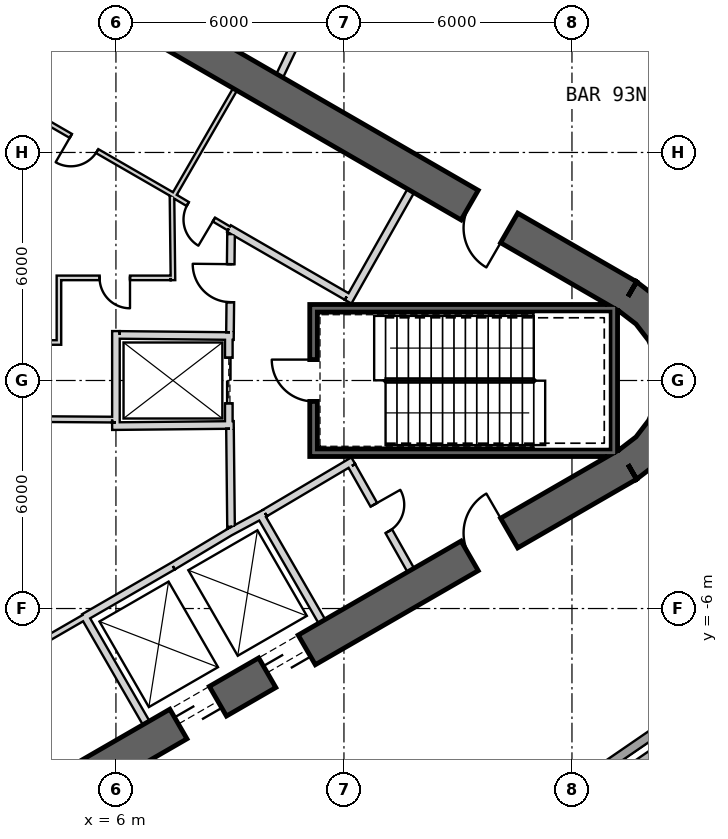
"""IFC4 building model, lengths in metres.
Left out: names, types, materials, properties, quantities, classifications, styles, units other than length and angle.
Written with IfcOpenShell. Run it as: python <this file> out.ifc"""

import sys

from ifc_helpers import new_model, si_unit, direction, frame, frame_2d, origin, place, context, subcontext, project, spatial, polyline, rectangle, outline, extrude, element, fill, save


model = new_model("IFC4")
c1 = context("Model", 3, precision=1e-05, world=origin(), true_north=direction((0.0, 1.0)))
c2 = subcontext(c1, "Body", "Model", "MODEL_VIEW")
j1 = project(units=[si_unit("LENGTHUNIT", "METRE"), si_unit("PLANEANGLEUNIT", "RADIAN")], contexts=[c1])
p1 = place(None, origin())
s1 = spatial("IfcSite", under=j1, at=p1, CompositionType="ELEMENT")
p2 = place(p1, origin())
s2 = spatial("IfcBuilding", under=s1, at=p2, CompositionType="ELEMENT")
p3 = place(p2, frame((0.0, 0.0, 410.3)))
s3 = spatial("IfcBuildingStorey", under=s2, at=p3, CompositionType="ELEMENT", Elevation=410.3)
p4 = place(p3, frame((19.475, 2.208, 0.0), z_axis=(0.0, 0.0, 1.0), x_axis=(-0.866028369851, 0.499994862586, 0.0)))
e1 = element("IfcWall", 1, at=p4, inside=s3, PredefinedType="SHEAR", context=c2, shape_type="SweptSolid", body=[
    extrude(rectangle(XDim=31.523, YDim=0.9, at=frame_2d((15.762, 0.0))), origin(), (0.0, 0.0, 1.0), 5.0),
])
p5 = place(p4, frame((3.612, 0.0, 0.0)))
e2 = element("IfcOpeningElement", 2, at=p5, cuts=e1, PredefinedType="OPENING", context=c2, shape_type="SweptSolid", body=[
    extrude(rectangle(XDim=1.2, YDim=2.4, at=frame_2d((0.6, 1.2))), frame((0.0, 0.46, 0.0), z_axis=(0.0, -1.0, 0.0), x_axis=(1.0, 0.0, 0.0)), (0.0, 0.0, 1.0), 0.92),
])
p6 = place(p4, frame((26.712, 0.0, 0.0)))
e3 = element("IfcOpeningElement", 3, at=p6, cuts=e1, PredefinedType="OPENING", context=c2, shape_type="SweptSolid", body=[
    extrude(rectangle(XDim=1.2, YDim=2.4, at=frame_2d((0.6, 1.2))), frame((0.0, 0.46, 0.0), z_axis=(0.0, -1.0, 0.0), x_axis=(1.0, 0.0, 0.0)), (0.0, 0.0, 1.0), 0.92),
])
p7 = place(p3, frame((-7.825, -17.97, 0.0), z_axis=(0.0, 0.0, 1.0), x_axis=(0.866028369851, 0.499994862586, 0.0)))
e4 = element("IfcWall", 4, at=p7, inside=s3, PredefinedType="SHEAR", context=c2, shape_type="SweptSolid", body=[
    extrude(rectangle(XDim=31.523, YDim=0.9, at=frame_2d((15.762, 0.0))), origin(), (0.0, 0.0, 1.0), 5.0),
])
p8 = place(p7, frame((17.862, 0.0, 0.0)))
e5 = element("IfcOpeningElement", 5, at=p8, cuts=e4, PredefinedType="OPENING", context=c2, shape_type="SweptSolid", body=[
    extrude(rectangle(XDim=1.2, YDim=2.4, at=frame_2d((0.6, 1.2))), frame((0.0, 0.46, 0.0), z_axis=(0.0, -1.0, 0.0), x_axis=(1.0, 0.0, 0.0)), (0.0, 0.0, 1.0), 0.92),
])
p9 = place(p7, frame((20.562, 0.0, 0.0)))
e6 = element("IfcOpeningElement", 6, at=p9, cuts=e4, PredefinedType="OPENING", context=c2, shape_type="SweptSolid", body=[
    extrude(rectangle(XDim=1.2, YDim=2.4, at=frame_2d((0.6, 1.2))), frame((0.0, 0.46, 0.0), z_axis=(0.0, -1.0, 0.0), x_axis=(1.0, 0.0, 0.0)), (0.0, 0.0, 1.0), 0.92),
])
p10 = place(p7, frame((26.712, 0.0, 0.0)))
e7 = element("IfcOpeningElement", 7, at=p10, cuts=e4, PredefinedType="OPENING", context=c2, shape_type="SweptSolid", body=[
    extrude(rectangle(XDim=1.2, YDim=2.4, at=frame_2d((0.6, 1.2))), frame((0.0, 0.46, 0.0), z_axis=(0.0, -1.0, 0.0), x_axis=(1.0, 0.0, 0.0)), (0.0, 0.0, 1.0), 0.92),
])
p11 = place(p7, frame((3.612, 0.0, 0.0)))
e8 = element("IfcOpeningElement", 8, at=p11, cuts=e4, PredefinedType="OPENING", context=c2, shape_type="SweptSolid", body=[
    extrude(rectangle(XDim=1.2, YDim=2.4, at=frame_2d((0.6, 1.2))), frame((0.0, 0.46, 0.0), z_axis=(0.0, -1.0, 0.0), x_axis=(1.0, 0.0, 0.0)), (0.0, 0.0, 1.0), 0.92),
])
p12 = place(p3, origin())
e9 = element("IfcWall", 9, at=p12, inside=s3, PredefinedType="SHEAR", context=c2, shape_type="SweptSolid", body=[
    extrude(outline(polyline([(19.7, -2.598), (20.321, -2.121), (20.798, -1.5), (21.098, -0.777), (21.2, 0.0), (21.098, 0.777), (20.798, 1.5), (20.321, 2.121), (19.7, 2.598), (19.25, 1.819), (19.685, 1.485), (20.019, 1.05), (20.229, 0.543), (20.3, 0.0), (20.229, -0.543), (20.019, -1.05), (19.685, -1.485), (19.25, -1.819), (19.7, -2.598)])), origin(), (0.0, 0.0, 1.0), 5.0),
])
p13 = place(p3, frame((-1.186, -23.926, 0.0), z_axis=(0.0, 0.0, 1.0), x_axis=(0.824480875731, 0.565889817503, 0.0)))
e10 = element("IfcWall", 10, at=p13, inside=s3, PredefinedType="SOLIDWALL", context=c2, shape_type="SweptSolid", body=[
    extrude(rectangle(XDim=26.064, YDim=0.24, at=frame_2d((13.032, 0.0))), origin(), (0.0, 0.0, 1.0), 4.75),
])
p14 = place(p3, frame((21.34, -9.818, 0.04), z_axis=(0.0, 0.0, 1.0), x_axis=(-0.82447788812, -0.565894170319, 0.0)))
e11 = element("IfcWall", 11, at=p14, inside=s3, PredefinedType="PARAPET", context=c2, shape_type="SweptSolid", body=[
    extrude(rectangle(XDim=27.207, YDim=0.25, at=frame_2d((13.603, 0.0))), origin(), (0.0, 0.0, 1.0), 1.2),
])
p15 = place(p3, frame((20.588, -9.667, 0.04), z_axis=(0.0, 0.0, 1.0), x_axis=(-0.824474055668, -0.565899753958, 0.0)))
e12 = element("IfcWall", 12, at=p15, inside=s3, PredefinedType="PARAPET", context=c2, shape_type="SweptSolid", body=[
    extrude(rectangle(XDim=26.031, YDim=0.5, at=frame_2d((13.016, 0.0))), origin(), (0.0, 0.0, 1.0), 0.6),
])
p16 = place(p3, frame((6.795, -9.01, 0.0), z_axis=(0.0, 0.0, 1.0), x_axis=(-0.499984717929, 0.866034226713, 0.0)))
e13 = element("IfcWall", 13, at=p16, inside=s3, PredefinedType="PLUMBINGWALL", context=c2, shape_type="SweptSolid", body=[
    extrude(rectangle(XDim=3.25, YDim=0.2, at=frame_2d((1.625, 0.0))), origin(), (0.0, 0.0, 1.0), 4.75),
])
p17 = place(p3, frame((5.159, -6.236, 0.0), z_axis=(0.0, 0.0, 1.0), x_axis=(0.866036505625, 0.499980770555, 0.0)))
e14 = element("IfcWall", 14, at=p17, inside=s3, PredefinedType="PLUMBINGWALL", context=c2, shape_type="SweptSolid", body=[
    extrude(rectangle(XDim=2.7, YDim=0.2, at=frame_2d((1.35, 0.0))), origin(), (0.0, 0.0, 1.0), 4.75),
])
p18 = place(p3, frame((9.795, -3.525, 0.0), z_axis=(0.0, 0.0, 1.0), x_axis=(0.499984717929, -0.866034226713, 0.0)))
e15 = element("IfcWall", 15, at=p18, inside=s3, PredefinedType="PLUMBINGWALL", context=c2, shape_type="SweptSolid", body=[
    extrude(rectangle(XDim=3.25, YDim=0.2, at=frame_2d((1.625, 0.0))), origin(), (0.0, 0.0, 1.0), 4.75),
])
p19 = place(p3, frame((8.974, -3.999, 0.0), z_axis=(0.0, 0.0, 1.0), x_axis=(0.880907015104, 0.473289373154, 0.0)))
e16 = element("IfcWall", 16, at=p19, inside=s3, PredefinedType="PLUMBINGWALL", context=c2, shape_type="SweptSolid", body=[
    extrude(rectangle(XDim=1.078, YDim=0.2, at=frame_2d((0.539, 0.0))), origin(), (0.0, 0.0, 1.0), 4.75),
])
p20 = place(p3, frame((7.497, -4.886, 0.0), z_axis=(0.0, 0.0, 1.0), x_axis=(0.857516281273, 0.51445682749, 0.0)))
e17 = element("IfcWall", 17, at=p20, inside=s3, PredefinedType="PLUMBINGWALL", context=c2, shape_type="SweptSolid", body=[
    extrude(rectangle(XDim=1.845, YDim=0.2, at=frame_2d((0.922, 0.0))), origin(), (0.0, 0.0, 1.0), 4.75),
])
p21 = place(p3, frame((19.2, 1.9, -0.25), z_axis=(0.0, 0.0, 1.0), x_axis=(-1.0, 0.0, 0.0)))
e18 = element("IfcWall", 18, at=p21, inside=s3, PredefinedType="SHEAR", context=c2, shape_type="SweptSolid", body=[
    extrude(rectangle(XDim=8.1, YDim=0.2, at=frame_2d((4.05, 0.0))), origin(), (0.0, 0.0, 1.0), 5.0),
])
p22 = place(p3, frame((19.1, -2.0, -0.25), z_axis=(0.0, 0.0, 1.0), x_axis=(0.0, 1.0, 0.0)))
e19 = element("IfcWall", 19, at=p22, inside=s3, PredefinedType="SHEAR", context=c2, shape_type="SweptSolid", body=[
    extrude(rectangle(XDim=3.8, YDim=0.2, at=frame_2d((1.9, 0.0))), origin(), (0.0, 0.0, 1.0), 5.0),
])
p23 = place(p3, frame((11.1, -1.9, -0.25), z_axis=(0.0, 0.0, 1.0), x_axis=(1.0, 0.0, 0.0)))
e20 = element("IfcWall", 20, at=p23, inside=s3, PredefinedType="SHEAR", context=c2, shape_type="SweptSolid", body=[
    extrude(rectangle(XDim=7.9, YDim=0.2, at=frame_2d((3.95, 0.0))), origin(), (0.0, 0.0, 1.0), 5.0),
])
p24 = place(p3, frame((11.2, -1.8, -0.25), z_axis=(0.0, 0.0, 1.0), x_axis=(0.0, 1.0, 0.0)))
e21 = element("IfcWall", 21, at=p24, inside=s3, PredefinedType="SHEAR", context=c2, shape_type="SweptSolid", body=[
    extrude(rectangle(XDim=3.6, YDim=0.2, at=frame_2d((1.8, 0.0))), origin(), (0.0, 0.0, 1.0), 5.0),
])
p25 = place(p24, frame((1.25, 0.0, 0.25)))
e22 = element("IfcOpeningElement", 22, at=p25, cuts=e21, PredefinedType="OPENING", context=c2, shape_type="SweptSolid", body=[
    extrude(rectangle(XDim=1.1, YDim=2.1, at=frame_2d((0.55, 1.05))), frame((0.0, 0.11, 0.0), z_axis=(0.0, -1.0, 0.0), x_axis=(1.0, 0.0, 0.0)), (0.0, 0.0, 1.0), 0.22),
])
p26 = place(p3, frame((8.97, 1.2, 0.0), z_axis=(0.0, 0.0, 1.0), x_axis=(0.0, -1.0, 0.0)))
e23 = element("IfcWall", 23, at=p26, inside=s3, PredefinedType="PLUMBINGWALL", context=c2, shape_type="SweptSolid", body=[
    extrude(rectangle(XDim=2.4, YDim=0.2, at=frame_2d((1.2, 0.0))), origin(), (0.0, 0.0, 1.0), 4.75),
])
p27 = place(p26, frame((0.6, 0.0, 0.0)))
e24 = element("IfcOpeningElement", 24, at=p27, cuts=e23, PredefinedType="OPENING", context=c2, shape_type="SweptSolid", body=[
    extrude(rectangle(XDim=1.2, YDim=2.4, at=frame_2d((0.6, 1.2))), frame((0.0, 0.11, 0.0), z_axis=(0.0, -1.0, 0.0), x_axis=(1.0, 0.0, 0.0)), (0.0, 0.0, 1.0), 0.22),
])
p28 = place(p3, frame((9.1, -1.169, 0.0), z_axis=(0.0, 0.0, 1.0), x_axis=(-0.999950064753, -0.009993397809, 0.0)))
e25 = element("IfcWall", 25, at=p28, inside=s3, PredefinedType="PLUMBINGWALL", context=c2, shape_type="SweptSolid", body=[
    extrude(rectangle(XDim=3.2, YDim=0.2, at=frame_2d((1.6, 0.0))), origin(), (0.0, 0.0, 1.0), 4.75),
])
p29 = place(p3, frame((6.0, -1.1, 0.0), z_axis=(0.0, 0.0, 1.0), x_axis=(0.0, 1.0, 0.0)))
e26 = element("IfcWall", 26, at=p29, inside=s3, PredefinedType="PLUMBINGWALL", context=c2, shape_type="SweptSolid", body=[
    extrude(rectangle(XDim=2.4, YDim=0.2, at=frame_2d((1.2, 0.0))), origin(), (0.0, 0.0, 1.0), 4.75),
])
p30 = place(p3, frame((9.1, 1.169, 0.0), z_axis=(0.0, 0.0, 1.0), x_axis=(-0.99994990606, 0.010009264196, 0.0)))
e27 = element("IfcWall", 27, at=p30, inside=s3, PredefinedType="PLUMBINGWALL", context=c2, shape_type="SweptSolid", body=[
    extrude(rectangle(XDim=3.0, YDim=0.2, at=frame_2d((1.5, 0.0))), origin(), (0.0, 0.0, 1.0), 4.75),
])
p31 = place(p3, frame((9.133, 7.659, 0.0), z_axis=(0.0, 0.0, 1.0), x_axis=(-0.500017246033, -0.866015446554, 0.0)))
e28 = element("IfcWall", 28, at=p31, inside=s3, PredefinedType="PARTITIONING", context=c2, shape_type="SweptSolid", body=[
    extrude(rectangle(XDim=3.25, YDim=0.12, at=frame_2d((1.625, 0.0))), origin(), (0.0, 0.0, 1.0), 4.75),
])
p32 = place(p3, frame((12.11, 2.073, 0.0), z_axis=(0.0, 0.0, 1.0), x_axis=(0.49196600604, 0.870614408852, 0.0)))
e29 = element("IfcWall", 29, at=p32, inside=s3, PredefinedType="PARTITIONING", context=c2, shape_type="SweptSolid", body=[
    extrude(rectangle(XDim=3.35, YDim=0.2, at=frame_2d((1.675, 0.0))), origin(), (0.0, 0.0, 1.0), 4.75),
])
p33 = place(p3, frame((8.974, 3.999, 0.0), z_axis=(0.0, 0.0, 1.0), x_axis=(0.86601284211, -0.500021756827, 0.0)))
e30 = element("IfcWall", 30, at=p33, inside=s3, PredefinedType="PARTITIONING", context=c2, shape_type="SweptSolid", body=[
    extrude(rectangle(XDim=3.577, YDim=0.2, at=frame_2d((1.789, 0.0))), origin(), (0.0, 0.0, 1.0), 4.75),
])
p34 = place(p3, frame((7.493, 4.878, 0.0), z_axis=(0.0, 0.0, 1.0), x_axis=(0.859934455514, -0.510404479035, 0.0)))
e31 = element("IfcWall", 31, at=p34, inside=s3, PredefinedType="PARTITIONING", context=c2, shape_type="SweptSolid", body=[
    extrude(rectangle(XDim=1.722, YDim=0.12, at=frame_2d((0.861, 0.0))), origin(), (0.0, 0.0, 1.0), 4.75),
])
p35 = place(p34, frame((0.461, 0.0, 0.0)))
e32 = element("IfcOpeningElement", 32, at=p35, cuts=e31, PredefinedType="OPENING", context=c2, shape_type="SweptSolid", body=[
    extrude(rectangle(XDim=0.8, YDim=2.1, at=frame_2d((0.4, 1.05))), frame((0.0, 0.07, 0.0), z_axis=(0.0, -1.0, 0.0), x_axis=(1.0, 0.0, 0.0)), (0.0, 0.0, 1.0), 0.14),
])
p36 = place(p3, frame((4.457, 10.359, 0.0), z_axis=(0.0, 0.0, 1.0), x_axis=(-0.500017246033, -0.866015446554, 0.0)))
e33 = element("IfcWall", 33, at=p36, inside=s3, PredefinedType="PARTITIONING", context=c2, shape_type="SweptSolid", body=[
    extrude(rectangle(XDim=3.25, YDim=0.12, at=frame_2d((1.625, 0.0))), origin(), (0.0, 0.0, 1.0), 4.75),
])
p37 = place(p3, frame((7.497, 4.886, 0.0), z_axis=(0.0, 0.0, 1.0), x_axis=(-0.866030989016, 0.499990325971, 0.0)))
e34 = element("IfcWall", 34, at=p37, inside=s3, PredefinedType="PARTITIONING", context=c2, shape_type="SweptSolid", body=[
    extrude(rectangle(XDim=8.1, YDim=0.12, at=frame_2d((4.05, 0.0))), origin(), (0.0, 0.0, 1.0), 4.75),
])
p38 = place(p37, frame((2.3, 0.0, 0.0)))
e35 = element("IfcOpeningElement", 35, at=p38, cuts=e34, PredefinedType="OPENING", context=c2, shape_type="SweptSolid", body=[
    extrude(rectangle(XDim=0.8, YDim=2.1, at=frame_2d((0.4, 1.05))), frame((0.0, 0.07, 0.0), z_axis=(0.0, -1.0, 0.0), x_axis=(1.0, 0.0, 0.0)), (0.0, 0.0, 1.0), 0.14),
])
p39 = place(p37, frame((6.35, 0.0, 0.0)))
e36 = element("IfcOpeningElement", 36, at=p39, cuts=e34, PredefinedType="OPENING", context=c2, shape_type="SweptSolid", body=[
    extrude(rectangle(XDim=0.8, YDim=2.1, at=frame_2d((0.4, 1.05))), frame((0.0, 0.07, 0.0), z_axis=(0.0, -1.0, 0.0), x_axis=(1.0, 0.0, 0.0)), (0.0, 0.0, 1.0), 0.14),
])
p40 = place(p3, frame((0.483, -8.936, 0.0), z_axis=(0.0, 0.0, 1.0), x_axis=(0.866028230842, 0.499995103361, 0.0)))
e37 = element("IfcWall", 37, at=p40, inside=s3, PredefinedType="PLUMBINGWALL", context=c2, shape_type="SweptSolid", body=[
    extrude(rectangle(XDim=5.4, YDim=0.15, at=frame_2d((2.7, 0.0))), origin(), (0.0, 0.0, 1.0), 4.75),
])
p41 = place(p3, frame((12.245, -2.109, 0.0), z_axis=(0.0, 0.0, 1.0), x_axis=(-0.860414880418, -0.509594185166, 0.0)))
e38 = element("IfcWall", 38, at=p41, inside=s3, PredefinedType="PARTITIONING", context=c2, shape_type="SweptSolid", body=[
    extrude(rectangle(XDim=2.7, YDim=0.2, at=frame_2d((1.35, 0.0))), origin(), (0.0, 0.0, 1.0), 4.75),
])
p42 = place(p3, frame((13.758, -4.99, 0.0), z_axis=(0.0, 0.0, 1.0), x_axis=(-0.491993409184, 0.87059892334, 0.0)))
e39 = element("IfcWall", 39, at=p42, inside=s3, PredefinedType="PARTITIONING", context=c2, shape_type="SweptSolid", body=[
    extrude(rectangle(XDim=3.15, YDim=0.2, at=frame_2d((1.575, 0.0))), origin(), (0.0, 0.0, 1.0), 4.75),
])
p43 = place(p42, frame((1.175, 0.0, 0.0)))
e40 = element("IfcOpeningElement", 40, at=p43, cuts=e39, PredefinedType="OPENING", context=c2, shape_type="SweptSolid", body=[
    extrude(rectangle(XDim=0.8, YDim=2.1, at=frame_2d((0.4, 1.05))), frame((0.0, 0.11, 0.0), z_axis=(0.0, -1.0, 0.0), x_axis=(1.0, 0.0, 0.0)), (0.0, 0.0, 1.0), 0.22),
])
p44 = place(p3, frame((9.029, -3.851, 0.0), z_axis=(0.0, 0.0, 1.0), x_axis=(-0.010784614026, 0.999941844359, 0.0)))
e41 = element("IfcWall", 41, at=p44, inside=s3, PredefinedType="PARTITIONING", context=c2, shape_type="SweptSolid", body=[
    extrude(rectangle(XDim=2.581, YDim=0.2, at=frame_2d((1.291, 0.0))), origin(), (0.0, 0.0, 1.0), 4.75),
])
p45 = place(p3, frame((9.001, 1.27, 0.0), z_axis=(0.0, 0.0, 1.0), x_axis=(0.010780534828, 0.999941888346, 0.0)))
e42 = element("IfcWall", 42, at=p45, inside=s3, PredefinedType="PARTITIONING", context=c2, shape_type="SweptSolid", body=[
    extrude(rectangle(XDim=2.582, YDim=0.2, at=frame_2d((1.291, 0.0))), origin(), (0.0, 0.0, 1.0), 4.75),
])
p46 = place(p45, frame((0.791, 0.0, 0.0)))
e43 = element("IfcOpeningElement", 43, at=p46, cuts=e42, PredefinedType="OPENING", context=c2, shape_type="SweptSolid", body=[
    extrude(rectangle(XDim=1.0, YDim=2.1, at=frame_2d((0.5, 1.05))), frame((0.0, 0.11, 0.0), z_axis=(0.0, -1.0, 0.0), x_axis=(1.0, 0.0, 0.0)), (0.0, 0.0, 1.0), 0.22),
])
p47 = place(p3, frame((5.9, -1.029, 0.0), z_axis=(0.0, 0.0, 1.0), x_axis=(-0.999977210765, 0.00675114447, 0.0)))
e44 = element("IfcWall", 44, at=p47, inside=s3, PredefinedType="PLUMBINGWALL", context=c2, shape_type="SweptSolid", body=[
    extrude(rectangle(XDim=4.231, YDim=0.15, at=frame_2d((2.115, 0.0))), origin(), (0.0, 0.0, 1.0), 4.75),
])
p48 = place(p47, frame((1.716, 0.0, 0.0)))
e45 = element("IfcOpeningElement", 45, at=p48, cuts=e44, PredefinedType="OPENING", context=c2, shape_type="SweptSolid", body=[
    extrude(rectangle(XDim=0.8, YDim=2.1, at=frame_2d((0.4, 1.05))), frame((0.0, 0.085, 0.0), z_axis=(0.0, -1.0, 0.0), x_axis=(1.0, 0.0, 0.0)), (0.0, 0.0, 1.0), 0.17),
])
p49 = place(p3, frame((7.501, 2.64, 0.0), z_axis=(0.0, 0.0, 1.0), x_axis=(-0.01174194727, 0.999931060961, 0.0)))
e46 = element("IfcWall", 46, at=p49, inside=s3, PredefinedType="PARTITIONING", context=c2, shape_type="SweptSolid", body=[
    extrude(rectangle(XDim=2.225, YDim=0.12, at=frame_2d((1.112, 0.0))), origin(), (0.0, 0.0, 1.0), 4.75),
])
p50 = place(p3, frame((4.44, 2.7, 0.0), z_axis=(0.0, 0.0, 1.0), x_axis=(1.0, 0.0, 0.0)))
e47 = element("IfcWall", 47, at=p50, inside=s3, PredefinedType="PARTITIONING", context=c2, shape_type="SweptSolid", body=[
    extrude(rectangle(XDim=3.0, YDim=0.12, at=frame_2d((1.5, 0.0))), origin(), (0.0, 0.0, 1.0), 4.75),
])
p51 = place(p50, frame((1.13, 0.0, 0.0)))
e48 = element("IfcOpeningElement", 48, at=p51, cuts=e47, PredefinedType="OPENING", context=c2, shape_type="SweptSolid", body=[
    extrude(rectangle(XDim=0.8, YDim=2.1, at=frame_2d((0.4, 1.05))), frame((0.0, 0.07, 0.0), z_axis=(0.0, -1.0, 0.0), x_axis=(1.0, 0.0, 0.0)), (0.0, 0.0, 1.0), 0.14),
])
p52 = place(p3, frame((4.5, 0.94, 0.0), z_axis=(0.0, 0.0, 1.0), x_axis=(0.0, 1.0, 0.0)))
e49 = element("IfcWall", 49, at=p52, inside=s3, PredefinedType="PARTITIONING", context=c2, shape_type="SweptSolid", body=[
    extrude(rectangle(XDim=1.7, YDim=0.12, at=frame_2d((0.85, 0.0))), origin(), (0.0, 0.0, 1.0), 4.75),
])
p53 = place(p3, frame((1.542, 1.0, 0.0), z_axis=(0.0, 0.0, 1.0), x_axis=(1.0, 0.0, 0.0)))
e50 = element("IfcWall", 50, at=p53, inside=s3, PredefinedType="PARTITIONING", context=c2, shape_type="SweptSolid", body=[
    extrude(rectangle(XDim=2.898, YDim=0.12, at=frame_2d((1.449, 0.0))), origin(), (0.0, 0.0, 1.0), 4.75),
])
p54 = place(p3, frame((10.31, 8.019, 0.0), z_axis=(0.0, 0.0, 1.0), x_axis=(0.431086090509, 0.902310801537, 0.0)))
e51 = element("IfcWall", 51, at=p54, inside=s3, PredefinedType="PARTITIONING", context=c2, shape_type="SweptSolid", body=[
    extrude(rectangle(XDim=7.25, YDim=0.2, at=frame_2d((3.625, 0.0))), origin(), (0.0, 0.0, 1.0), 4.75),
])
p55 = place(p54, frame((3.2, 0.0, 0.0)))
e52 = element("IfcOpeningElement", 52, at=p55, cuts=e51, PredefinedType="OPENING", context=c2, shape_type="SweptSolid", body=[
    extrude(rectangle(XDim=1.0, YDim=2.1, at=frame_2d((0.5, 1.05))), frame((0.0, 0.11, 0.0), z_axis=(0.0, -1.0, 0.0), x_axis=(1.0, 0.0, 0.0)), (0.0, 0.0, 1.0), 0.22),
])
p56 = place(p25, origin())
e53 = element("IfcDoor", 53, at=p56, inside=s3, OperationType="SINGLE_SWING_RIGHT", PredefinedType="USERDEFINED", context=c2, shape_type="SweptSolid", body=[
    extrude(rectangle(XDim=1.1, YDim=2.1, at=frame_2d((0.55, 1.05))), frame((0.0, 0.025, 0.0), z_axis=(0.0, -1.0, 0.0), x_axis=(1.0, 0.0, 0.0)), (0.0, 0.0, 1.0), 0.05),
])
fill(e22, e53)
p57 = place(p46, origin())
e54 = element("IfcDoor", 54, at=p57, inside=s3, OperationType="SINGLE_SWING_RIGHT", PredefinedType="USERDEFINED", context=c2, shape_type="SweptSolid", body=[
    extrude(rectangle(XDim=1.0, YDim=2.1, at=frame_2d((0.5, 1.05))), frame((0.0, 0.025, 0.0), z_axis=(0.0, -1.0, 0.0), x_axis=(1.0, 0.0, 0.0)), (0.0, 0.0, 1.0), 0.05),
])
fill(e43, e54)
p58 = place(p27, origin())
e55 = element("IfcDoor", 55, at=p58, inside=s3, OperationType="SLIDING_TO_LEFT", PredefinedType="USERDEFINED", context=c2, shape_type="SweptSolid", body=[
    extrude(rectangle(XDim=1.2, YDim=2.4, at=frame_2d((0.6, 1.2))), frame((0.0, 0.025, 0.0), z_axis=(0.0, -1.0, 0.0), x_axis=(1.0, 0.0, 0.0)), (0.0, 0.0, 1.0), 0.05),
])
fill(e24, e55)
p59 = place(p51, origin())
e56 = element("IfcDoor", 56, at=p59, inside=s3, OperationType="SINGLE_SWING_RIGHT", PredefinedType="USERDEFINED", context=c2, shape_type="SweptSolid", body=[
    extrude(rectangle(XDim=0.8, YDim=2.1, at=frame_2d((0.4, 1.05))), frame((0.0, 0.025, 0.0), z_axis=(0.0, -1.0, 0.0), x_axis=(1.0, 0.0, 0.0)), (0.0, 0.0, 1.0), 0.05),
])
fill(e48, e56)
p60 = place(p35, origin())
e57 = element("IfcDoor", 57, at=p60, inside=s3, OperationType="SINGLE_SWING_RIGHT", PredefinedType="USERDEFINED", context=c2, shape_type="SweptSolid", body=[
    extrude(rectangle(XDim=0.8, YDim=2.1, at=frame_2d((0.4, 1.05))), frame((0.0, 0.025, 0.0), z_axis=(0.0, -1.0, 0.0), x_axis=(1.0, 0.0, 0.0)), (0.0, 0.0, 1.0), 0.05),
])
fill(e32, e57)
p61 = place(p38, origin())
e58 = element("IfcDoor", 58, at=p61, inside=s3, OperationType="SINGLE_SWING_RIGHT", PredefinedType="USERDEFINED", context=c2, shape_type="SweptSolid", body=[
    extrude(rectangle(XDim=0.8, YDim=2.1, at=frame_2d((0.4, 1.05))), frame((0.0, 0.025, 0.0), z_axis=(0.0, -1.0, 0.0), x_axis=(1.0, 0.0, 0.0)), (0.0, 0.0, 1.0), 0.05),
])
fill(e35, e58)
p62 = place(p43, origin())
e59 = element("IfcDoor", 59, at=p62, inside=s3, OperationType="SINGLE_SWING_RIGHT", PredefinedType="USERDEFINED", context=c2, shape_type="SweptSolid", body=[
    extrude(rectangle(XDim=0.8, YDim=2.1, at=frame_2d((0.4, 1.05))), frame((0.0, 0.025, 0.0), z_axis=(0.0, -1.0, 0.0), x_axis=(1.0, 0.0, 0.0)), (0.0, 0.0, 1.0), 0.05),
])
fill(e40, e59)
p63 = place(p8, origin())
e60 = element("IfcDoor", 60, at=p63, inside=s3, OperationType="SLIDING_TO_LEFT", PredefinedType="USERDEFINED", context=c2, shape_type="SweptSolid", body=[
    extrude(rectangle(XDim=1.2, YDim=2.4, at=frame_2d((0.6, 1.2))), frame((0.0, 0.025, 0.0), z_axis=(0.0, -1.0, 0.0), x_axis=(1.0, 0.0, 0.0)), (0.0, 0.0, 1.0), 0.05),
])
fill(e5, e60)
p64 = place(p9, origin())
e61 = element("IfcDoor", 61, at=p64, inside=s3, OperationType="SLIDING_TO_LEFT", PredefinedType="USERDEFINED", context=c2, shape_type="SweptSolid", body=[
    extrude(rectangle(XDim=1.2, YDim=2.4, at=frame_2d((0.6, 1.2))), frame((0.0, 0.025, 0.0), z_axis=(0.0, -1.0, 0.0), x_axis=(1.0, 0.0, 0.0)), (0.0, 0.0, 1.0), 0.05),
])
fill(e6, e61)
p65 = place(p10, origin())
e62 = element("IfcDoor", 62, at=p65, inside=s3, OperationType="SINGLE_SWING_RIGHT", PredefinedType="USERDEFINED", context=c2, shape_type="SweptSolid", body=[
    extrude(rectangle(XDim=1.2, YDim=2.4, at=frame_2d((0.6, 1.2))), frame((0.0, 0.025, 0.0), z_axis=(0.0, -1.0, 0.0), x_axis=(1.0, 0.0, 0.0)), (0.0, 0.0, 1.0), 0.05),
])
fill(e7, e62)
p66 = place(p5, origin())
e63 = element("IfcDoor", 63, at=p66, inside=s3, OperationType="SINGLE_SWING_LEFT", PredefinedType="USERDEFINED", context=c2, shape_type="SweptSolid", body=[
    extrude(rectangle(XDim=1.2, YDim=2.4, at=frame_2d((0.6, 1.2))), frame((0.0, 0.025, 0.0), z_axis=(0.0, -1.0, 0.0), x_axis=(1.0, 0.0, 0.0)), (0.0, 0.0, 1.0), 0.05),
])
fill(e2, e63)
save(model, sys.argv[1])
